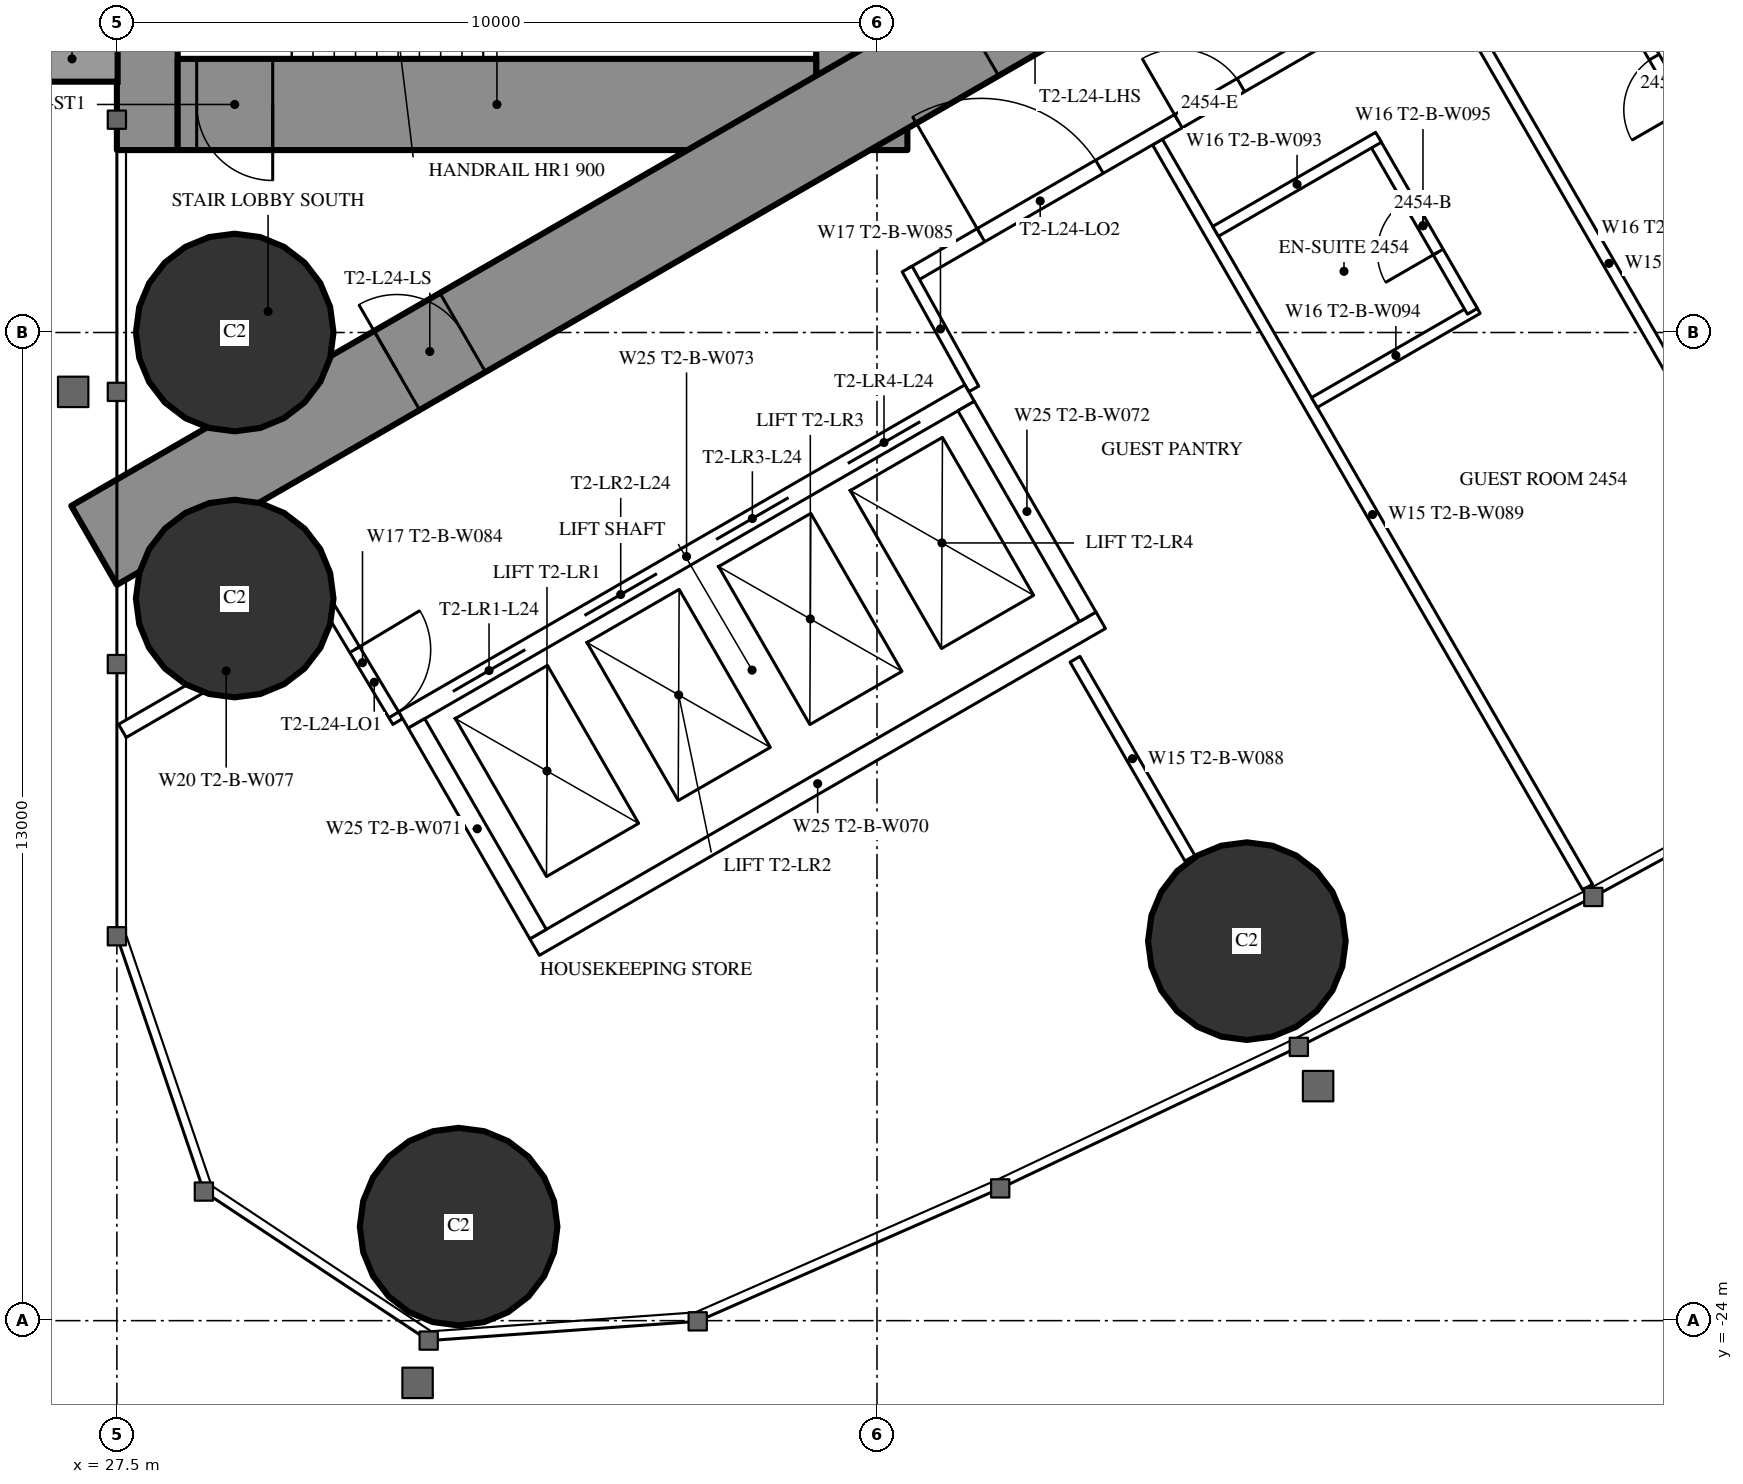
"""IFC4 building model, lengths in metres.
Left out: names, types, materials, properties, quantities, classifications, styles, units other than length and angle.
Written with IfcOpenShell. Run it as: python <this file> out.ifc"""

import sys

from ifc_helpers import new_model, si_unit, direction, frame, frame_2d, origin, origin_2d, place, context, subcontext, project, spatial, rectangle, hollow_circle, extrude, element, fill, save


model = new_model("IFC4")
c1 = context("Model", 3, precision=1e-05, world=origin(), true_north=direction((0.0, 1.0)))
c2 = subcontext(c1, "Body", "Model", "MODEL_VIEW")
j1 = project(units=[si_unit("LENGTHUNIT", "METRE"), si_unit("PLANEANGLEUNIT", "RADIAN")], contexts=[c1])
p1 = place(None, origin())
s1 = spatial("IfcSite", under=j1, at=p1, CompositionType="ELEMENT")
p2 = place(p1, origin())
s2 = spatial("IfcBuilding", under=s1, at=p2, CompositionType="ELEMENT")
p3 = place(p2, frame((0.0, 0.0, 94.1)))
s3 = spatial("IfcBuildingStorey", under=s2, at=p3, CompositionType="ELEMENT", Elevation=94.1)
for number, where, z_axis, x_axis in (
    (1, (31.996, -22.763, 0.0), (0.0, 0.0, 1.0), (1.0, 0.0, 0.0)),
    (2, (29.05, -11.0, 0.0), (0.0, 0.0, 1.0), (1.0, 0.0, 0.0)),
    (3, (29.05, -14.5, 0.0), (0.0, 0.0, 1.0), (1.0, 0.0, 0.0)),
    (4, (42.366, -19.007, 0.0), (0.0, 0.0, 1.0), (1.0, 0.0, 0.0)),
):
    element("IfcColumn", number, at=place(p3, frame(where, z_axis=z_axis, x_axis=x_axis)), inside=s3, PredefinedType="COLUMN", context=c2, shape_type="SweptSolid", body=[
        extrude(hollow_circle(Radius=1.3, WallThickness=0.1, at=origin_2d()), origin(), (0.0, 0.0, 1.0), 3.5),
    ])
p4 = place(p3, frame((27.9, -8.6, 0.0), z_axis=(0.0, 0.0, 1.0), x_axis=(0.0, 1.0, 0.0)))
e5 = element("IfcWall", 5, at=p4, inside=s3, PredefinedType="SHEAR", context=c2, shape_type="SweptSolid", body=[
    extrude(rectangle(XDim=17.2, YDim=0.8, at=frame_2d((8.6, 0.0))), origin(), (0.0, 0.0, 1.0), 3.5),
])
p5 = place(p4, frame((2.45, 0.0, 0.6)))
e6 = element("IfcOpeningElement", 6, at=p5, cuts=e5, PredefinedType="OPENING", context=c2, shape_type="SweptSolid", body=[
    extrude(rectangle(XDim=0.6, YDim=2.1, at=frame_2d((0.3, 1.05))), frame((0.0, 0.41, 0.0), z_axis=(0.0, -1.0, 0.0), x_axis=(1.0, 0.0, 0.0)), (0.0, 0.0, 1.0), 0.82),
])
p6 = place(p4, frame((14.15, 0.0, 0.6)))
e7 = element("IfcOpeningElement", 7, at=p6, cuts=e5, PredefinedType="OPENING", context=c2, shape_type="SweptSolid", body=[
    extrude(rectangle(XDim=0.6, YDim=2.1, at=frame_2d((0.3, 1.05))), frame((0.0, 0.41, 0.0), z_axis=(0.0, -1.0, 0.0), x_axis=(1.0, 0.0, 0.0)), (0.0, 0.0, 1.0), 0.82),
])
p7 = place(p3, frame((37.3, -8.6, 0.0), z_axis=(0.0, 0.0, 1.0), x_axis=(0.0, 1.0, 0.0)))
e8 = element("IfcWall", 8, at=p7, inside=s3, PredefinedType="SHEAR", context=c2, shape_type="SweptSolid", body=[
    extrude(rectangle(XDim=17.2, YDim=1.2, at=frame_2d((8.6, 0.0))), origin(), (0.0, 0.0, 1.0), 3.5),
])
p8 = place(p7, frame((7.7, 0.0, 0.0)))
e9 = element("IfcOpeningElement", 9, at=p8, cuts=e8, PredefinedType="OPENING", context=c2, shape_type="SweptSolid", body=[
    extrude(rectangle(XDim=1.8, YDim=2.2, at=frame_2d((0.9, 1.1))), frame((0.0, 0.61, 0.0), z_axis=(0.0, -1.0, 0.0), x_axis=(1.0, 0.0, 0.0)), (0.0, 0.0, 1.0), 1.22),
])
p9 = place(p3, frame((28.3, -8.0, 0.0), z_axis=(0.0, 0.0, 1.0), x_axis=(1.0, 0.0, 0.0)))
e10 = element("IfcWall", 10, at=p9, inside=s3, PredefinedType="SHEAR", context=c2, shape_type="SweptSolid", body=[
    extrude(rectangle(XDim=8.4, YDim=1.2, at=frame_2d((4.2, 0.0))), origin(), (0.0, 0.0, 1.0), 3.5),
])
p10 = place(p9, frame((0.25, 0.0, 0.0)))
e11 = element("IfcOpeningElement", 11, at=p10, cuts=e10, PredefinedType="OPENING", context=c2, shape_type="SweptSolid", body=[
    extrude(rectangle(XDim=1.0, YDim=2.2, at=frame_2d((0.5, 1.1))), frame((0.0, 0.61, 0.0), z_axis=(0.0, -1.0, 0.0), x_axis=(1.0, 0.0, 0.0)), (0.0, 0.0, 1.0), 1.22),
])
p11 = place(p3, frame((27.2, -13.8, 0.0), z_axis=(0.0, 0.0, 1.0), x_axis=(0.866027159892, 0.499996958321, 0.0)))
e12 = element("IfcWall", 12, at=p11, inside=s3, PredefinedType="SHEAR", context=c2, shape_type="SweptSolid", body=[
    extrude(rectangle(XDim=27.947, YDim=1.2, at=frame_2d((13.973, 0.0))), origin(), (0.0, 0.0, 1.0), 3.5),
])
p12 = place(p11, frame((4.6, 0.0, 0.0)))
e13 = element("IfcOpeningElement", 13, at=p12, cuts=e12, PredefinedType="OPENING", context=c2, shape_type="SweptSolid", body=[
    extrude(rectangle(XDim=1.0, YDim=2.2, at=frame_2d((0.5, 1.1))), frame((0.0, 0.61, 0.0), z_axis=(0.0, -1.0, 0.0), x_axis=(1.0, 0.0, 0.0)), (0.0, 0.0, 1.0), 1.22),
])
p13 = place(p11, frame((13.395, 0.0, 0.0)))
e14 = element("IfcOpeningElement", 14, at=p13, cuts=e12, PredefinedType="OPENING", context=c2, shape_type="SweptSolid", body=[
    extrude(rectangle(XDim=1.8, YDim=2.2, at=frame_2d((0.9, 1.1))), frame((0.0, 0.61, 0.0), z_axis=(0.0, -1.0, 0.0), x_axis=(1.0, 0.0, 0.0)), (0.0, 0.0, 1.0), 1.22),
])
p14 = place(p3, frame((41.19, -8.494, 0.0), z_axis=(0.0, 0.0, 1.0), x_axis=(0.49999258054, -0.866029687369, 0.0)))
e15 = element("IfcWall", 15, at=p14, inside=s3, PredefinedType="PARTITIONING", context=c2, shape_type="SweptSolid", body=[
    extrude(rectangle(XDim=11.318, YDim=0.15, at=frame_2d((5.659, 0.0))), origin(), (0.0, 0.0, 1.0), 3.25),
])
p15 = place(p3, frame((44.954, -6.321, 0.0), z_axis=(0.0, 0.0, 1.0), x_axis=(0.500018676722, -0.866014620505, 0.0)))
e16 = element("IfcWall", 16, at=p15, inside=s3, PredefinedType="PARTITIONING", context=c2, shape_type="SweptSolid", body=[
    extrude(rectangle(XDim=8.704, YDim=0.15, at=frame_2d((4.352, 0.0))), origin(), (0.0, 0.0, 1.0), 2.2),
])
p16 = place(p3, frame((40.105, -15.299, 0.0), z_axis=(0.0, 0.0, 1.0), x_axis=(0.499978822259, -0.866037630414, 0.0)))
e17 = element("IfcWall", 17, at=p16, inside=s3, PredefinedType="PARTITIONING", context=c2, shape_type="SweptSolid", body=[
    extrude(rectangle(XDim=3.023, YDim=0.15, at=frame_2d((1.511, 0.0))), origin(), (0.0, 0.0, 1.0), 3.25),
])
p17 = place(p3, frame((27.572, -16.241, 0.0), z_axis=(0.0, 0.0, 1.0), x_axis=(0.866029654818, 0.499992636921, 0.0)))
e18 = element("IfcWall", 18, at=p17, inside=s3, PredefinedType="PARTITIONING", context=c2, shape_type="SweptSolid", body=[
    extrude(rectangle(XDim=3.155, YDim=0.2, at=frame_2d((1.577, 0.0))), origin(), (0.0, 0.0, 1.0), 3.25),
])
p18 = place(p3, frame((37.96, -10.243, 0.0), z_axis=(0.0, 0.0, 1.0), x_axis=(0.866026429433, 0.499998223521, 0.0)))
e19 = element("IfcWall", 19, at=p18, inside=s3, PredefinedType="PARTITIONING", context=c2, shape_type="SweptSolid", body=[
    extrude(rectangle(XDim=20.487, YDim=0.2, at=frame_2d((10.243, 0.0))), origin(), (0.0, 0.0, 1.0), 3.25),
])
p19 = place(p18, frame((4.047, 0.0, 0.0)))
e20 = element("IfcOpeningElement", 20, at=p19, cuts=e19, PredefinedType="OPENING", context=c2, shape_type="SweptSolid", body=[
    extrude(rectangle(XDim=0.95, YDim=2.2, at=frame_2d((0.475, 1.1))), frame((0.0, 0.11, 0.0), z_axis=(0.0, -1.0, 0.0), x_axis=(1.0, 0.0, 0.0)), (0.0, 0.0, 1.0), 0.22),
])
p20 = place(p18, frame((11.04, 0.0, 0.0)))
e21 = element("IfcOpeningElement", 21, at=p20, cuts=e19, PredefinedType="OPENING", context=c2, shape_type="SweptSolid", body=[
    extrude(rectangle(XDim=0.95, YDim=2.2, at=frame_2d((0.475, 1.1))), frame((0.0, 0.11, 0.0), z_axis=(0.0, -1.0, 0.0), x_axis=(1.0, 0.0, 0.0)), (0.0, 0.0, 1.0), 0.22),
])
p21 = place(p18, frame((13.035, 0.0, 0.0)))
e22 = element("IfcOpeningElement", 22, at=p21, cuts=e19, PredefinedType="OPENING", context=c2, shape_type="SweptSolid", body=[
    extrude(rectangle(XDim=0.95, YDim=2.2, at=frame_2d((0.475, 1.1))), frame((0.0, 0.11, 0.0), z_axis=(0.0, -1.0, 0.0), x_axis=(1.0, 0.0, 0.0)), (0.0, 0.0, 1.0), 0.22),
])
p22 = place(p18, frame((17.085, 0.0, 0.0)))
e23 = element("IfcOpeningElement", 23, at=p22, cuts=e19, PredefinedType="OPENING", context=c2, shape_type="SweptSolid", body=[
    extrude(rectangle(XDim=0.95, YDim=2.2, at=frame_2d((0.475, 1.1))), frame((0.0, 0.11, 0.0), z_axis=(0.0, -1.0, 0.0), x_axis=(1.0, 0.0, 0.0)), (0.0, 0.0, 1.0), 0.22),
])
p23 = place(p18, frame((1.048, 0.0, 0.0)))
e24 = element("IfcOpeningElement", 24, at=p23, cuts=e19, PredefinedType="OPENING", context=c2, shape_type="SweptSolid", body=[
    extrude(rectangle(XDim=1.8, YDim=2.2, at=frame_2d((0.9, 1.1))), frame((0.0, 0.11, 0.0), z_axis=(0.0, -1.0, 0.0), x_axis=(1.0, 0.0, 0.0)), (0.0, 0.0, 1.0), 0.22),
])
p24 = place(p3, frame((30.267, -14.569, 0.0), z_axis=(0.0, 0.0, 1.0), x_axis=(0.514336634837, -0.857588377991, 0.0)))
e25 = element("IfcWall", 25, at=p24, inside=s3, PredefinedType="PARTITIONING", context=c2, shape_type="SweptSolid", body=[
    extrude(rectangle(XDim=1.805, YDim=0.15, at=frame_2d((0.903, 0.0))), origin(), (0.0, 0.0, 1.0), 3.25),
])
p25 = place(p24, frame((0.703, 0.0, 0.0)))
e26 = element("IfcOpeningElement", 26, at=p25, cuts=e25, PredefinedType="OPENING", context=c2, shape_type="SweptSolid", body=[
    extrude(rectangle(XDim=1.0, YDim=2.2, at=frame_2d((0.5, 1.1))), frame((0.0, 0.085, 0.0), z_axis=(0.0, -1.0, 0.0), x_axis=(1.0, 0.0, 0.0)), (0.0, 0.0, 1.0), 0.17),
])
p26 = place(p3, frame((38.773, -11.742, 0.0), z_axis=(0.0, 0.0, 1.0), x_axis=(-0.485528096672, 0.8742210632, 0.0)))
e27 = element("IfcWall", 27, at=p26, inside=s3, PredefinedType="PARTITIONING", context=c2, shape_type="SweptSolid", body=[
    extrude(rectangle(XDim=1.805, YDim=0.15, at=frame_2d((0.903, 0.0))), origin(), (0.0, 0.0, 1.0), 3.25),
])
p27 = place(p3, frame((43.255, -11.921, 0.0), z_axis=(0.0, 0.0, 1.0), x_axis=(0.866006523861, 0.500032699561, 0.0)))
e28 = element("IfcWall", 28, at=p27, inside=s3, PredefinedType="PARTITIONING", context=c2, shape_type="SweptSolid", body=[
    extrude(rectangle(XDim=2.475, YDim=0.15, at=frame_2d((1.237, 0.0))), origin(), (0.0, 0.0, 1.0), 3.25),
])
p28 = place(p3, frame((44.033, -8.469, 0.0), z_axis=(0.0, 0.0, 1.0), x_axis=(0.500047596559, -0.865997922154, 0.0)))
e29 = element("IfcWall", 29, at=p28, inside=s3, PredefinedType="PARTITIONING", context=c2, shape_type="SweptSolid", body=[
    extrude(rectangle(XDim=2.6, YDim=0.15, at=frame_2d((1.3, 0.0))), origin(), (0.0, 0.0, 1.0), 3.25),
])
p29 = place(p28, frame((0.9, 0.0, 0.0)))
e30 = element("IfcOpeningElement", 30, at=p29, cuts=e29, PredefinedType="OPENING", context=c2, shape_type="SweptSolid", body=[
    extrude(rectangle(XDim=0.8, YDim=2.2, at=frame_2d((0.4, 1.1))), frame((0.0, 0.085, 0.0), z_axis=(0.0, -1.0, 0.0), x_axis=(1.0, 0.0, 0.0)), (0.0, 0.0, 1.0), 0.17),
])
p30 = place(p3, frame((41.955, -9.669, 0.0), z_axis=(0.0, 0.0, 1.0), x_axis=(0.866006523861, 0.500032699561, 0.0)))
e31 = element("IfcWall", 31, at=p30, inside=s3, PredefinedType="PARTITIONING", context=c2, shape_type="SweptSolid", body=[
    extrude(rectangle(XDim=2.475, YDim=0.15, at=frame_2d((1.237, 0.0))), origin(), (0.0, 0.0, 1.0), 3.25),
])
p31 = place(p3, frame((47.275, -6.597, 0.0), z_axis=(0.0, 0.0, 1.0), x_axis=(0.499936506574, -0.866062058628, 0.0)))
e32 = element("IfcWall", 32, at=p31, inside=s3, PredefinedType="PARTITIONING", context=c2, shape_type="SweptSolid", body=[
    extrude(rectangle(XDim=2.6, YDim=0.15, at=frame_2d((1.3, 0.0))), origin(), (0.0, 0.0, 1.0), 3.25),
])
p32 = place(p31, frame((0.9, 0.0, 0.0)))
e33 = element("IfcOpeningElement", 33, at=p32, cuts=e32, PredefinedType="OPENING", context=c2, shape_type="SweptSolid", body=[
    extrude(rectangle(XDim=0.8, YDim=2.2, at=frame_2d((0.4, 1.1))), frame((0.0, 0.085, 0.0), z_axis=(0.0, -1.0, 0.0), x_axis=(1.0, 0.0, 0.0)), (0.0, 0.0, 1.0), 0.17),
])
p33 = place(p3, frame((31.271, -16.097, 0.0), z_axis=(0.0, 0.0, 1.0), x_axis=(0.86604045752, 0.499973925258, 0.0)))
e34 = element("IfcWall", 34, at=p33, inside=s3, PredefinedType="PARTITIONING", context=c2, shape_type="SweptSolid", body=[
    extrude(rectangle(XDim=8.6, YDim=0.25, at=frame_2d((4.3, 0.0))), origin(), (0.0, 0.0, 1.0), 3.25),
])
p34 = place(p33, frame((0.75, 0.0, 0.0)))
e35 = element("IfcOpeningElement", 35, at=p34, cuts=e34, PredefinedType="OPENING", context=c2, shape_type="SweptSolid", body=[
    extrude(rectangle(XDim=1.1, YDim=2.2, at=frame_2d((0.55, 1.1))), frame((0.0, 0.135, 0.0), z_axis=(0.0, -1.0, 0.0), x_axis=(1.0, 0.0, 0.0)), (0.0, 0.0, 1.0), 0.27),
])
p35 = place(p33, frame((2.75, 0.0, 0.0)))
e36 = element("IfcOpeningElement", 36, at=p35, cuts=e34, PredefinedType="OPENING", context=c2, shape_type="SweptSolid", body=[
    extrude(rectangle(XDim=1.1, YDim=2.2, at=frame_2d((0.55, 1.1))), frame((0.0, 0.135, 0.0), z_axis=(0.0, -1.0, 0.0), x_axis=(1.0, 0.0, 0.0)), (0.0, 0.0, 1.0), 0.27),
])
p36 = place(p33, frame((4.75, 0.0, 0.0)))
e37 = element("IfcOpeningElement", 37, at=p36, cuts=e34, PredefinedType="OPENING", context=c2, shape_type="SweptSolid", body=[
    extrude(rectangle(XDim=1.1, YDim=2.2, at=frame_2d((0.55, 1.1))), frame((0.0, 0.135, 0.0), z_axis=(0.0, -1.0, 0.0), x_axis=(1.0, 0.0, 0.0)), (0.0, 0.0, 1.0), 0.27),
])
p37 = place(p33, frame((6.75, 0.0, 0.0)))
e38 = element("IfcOpeningElement", 38, at=p37, cuts=e34, PredefinedType="OPENING", context=c2, shape_type="SweptSolid", body=[
    extrude(rectangle(XDim=1.1, YDim=2.2, at=frame_2d((0.55, 1.1))), frame((0.0, 0.135, 0.0), z_axis=(0.0, -1.0, 0.0), x_axis=(1.0, 0.0, 0.0)), (0.0, 0.0, 1.0), 0.27),
])
p38 = place(p3, frame((32.996, -19.086, 0.0), z_axis=(0.0, 0.0, 1.0), x_axis=(0.866028165386, 0.499995216735, 0.0)))
e39 = element("IfcWall", 39, at=p38, inside=s3, PredefinedType="PARTITIONING", context=c2, shape_type="SweptSolid", body=[
    extrude(rectangle(XDim=8.6, YDim=0.25, at=frame_2d((4.3, 0.0))), origin(), (0.0, 0.0, 1.0), 3.25),
])
for number, where, z_axis, x_axis in (
    (40, (31.441, -16.143, 0.0), (0.0, 0.0, 1.0), (0.5, -0.866, 0.0)),
    (41, (38.673, -11.968, 0.0), (0.0, 0.0, 1.0), (0.5, -0.866, 0.0)),
):
    element("IfcWall", number, at=place(p3, frame(where, z_axis=z_axis, x_axis=x_axis)), inside=s3, PredefinedType="PARTITIONING", context=c2, shape_type="SweptSolid", body=[
        extrude(rectangle(XDim=3.201, YDim=0.25, at=frame_2d((1.6, 0.0))), origin(), (0.0, 0.0, 1.0), 3.25),
    ])
p39 = place(p29, origin())
e42 = element("IfcDoor", 42, at=p39, inside=s3, OperationType="SINGLE_SWING_RIGHT", PredefinedType="DOOR", context=c2, shape_type="SweptSolid", body=[
    extrude(rectangle(XDim=0.8, YDim=2.2, at=frame_2d((0.4, 1.1))), frame((0.0, 0.025, 0.0), z_axis=(0.0, -1.0, 0.0), x_axis=(1.0, 0.0, 0.0)), (0.0, 0.0, 1.0), 0.05),
])
fill(e30, e42)
p40 = place(p19, origin())
e43 = element("IfcDoor", 43, at=p40, inside=s3, OperationType="SINGLE_SWING_LEFT", PredefinedType="DOOR", context=c2, shape_type="SweptSolid", body=[
    extrude(rectangle(XDim=0.95, YDim=2.2, at=frame_2d((0.475, 1.1))), frame((0.0, 0.025, 0.0), z_axis=(0.0, -1.0, 0.0), x_axis=(1.0, 0.0, 0.0)), (0.0, 0.0, 1.0), 0.05),
])
fill(e20, e43)
p41 = place(p32, origin())
e44 = element("IfcDoor", 44, at=p41, inside=s3, OperationType="SINGLE_SWING_RIGHT", PredefinedType="DOOR", context=c2, shape_type="SweptSolid", body=[
    extrude(rectangle(XDim=0.8, YDim=2.2, at=frame_2d((0.4, 1.1))), frame((0.0, 0.025, 0.0), z_axis=(0.0, -1.0, 0.0), x_axis=(1.0, 0.0, 0.0)), (0.0, 0.0, 1.0), 0.05),
])
fill(e33, e44)
p42 = place(p25, origin())
e45 = element("IfcDoor", 45, at=p42, inside=s3, OperationType="SINGLE_SWING_LEFT", PredefinedType="DOOR", context=c2, shape_type="SweptSolid", body=[
    extrude(rectangle(XDim=1.0, YDim=2.2, at=frame_2d((0.5, 1.1))), frame((0.0, 0.025, 0.0), z_axis=(0.0, -1.0, 0.0), x_axis=(1.0, 0.0, 0.0)), (0.0, 0.0, 1.0), 0.05),
])
fill(e26, e45)
p43 = place(p23, origin())
e46 = element("IfcDoor", 46, at=p43, inside=s3, OperationType="DOUBLE_DOOR_SINGLE_SWING", PredefinedType="DOOR", context=c2, shape_type="SweptSolid", body=[
    extrude(rectangle(XDim=1.8, YDim=2.2, at=frame_2d((0.9, 1.1))), frame((0.0, 0.025, 0.0), z_axis=(0.0, -1.0, 0.0), x_axis=(1.0, 0.0, 0.0)), (0.0, 0.0, 1.0), 0.05),
])
fill(e24, e46)
p44 = place(p12, origin())
e47 = element("IfcDoor", 47, at=p44, inside=s3, OperationType="SINGLE_SWING_LEFT", PredefinedType="DOOR", context=c2, shape_type="SweptSolid", body=[
    extrude(rectangle(XDim=1.0, YDim=2.2, at=frame_2d((0.5, 1.1))), frame((0.0, 0.025, 0.0), z_axis=(0.0, -1.0, 0.0), x_axis=(1.0, 0.0, 0.0)), (0.0, 0.0, 1.0), 0.05),
])
fill(e13, e47)
p45 = place(p10, origin())
e48 = element("IfcDoor", 48, at=p45, inside=s3, OperationType="SINGLE_SWING_RIGHT", PredefinedType="DOOR", context=c2, shape_type="SweptSolid", body=[
    extrude(rectangle(XDim=1.0, YDim=2.2, at=frame_2d((0.5, 1.1))), frame((0.0, 0.025, 0.0), z_axis=(0.0, -1.0, 0.0), x_axis=(1.0, 0.0, 0.0)), (0.0, 0.0, 1.0), 0.05),
])
fill(e11, e48)
p46 = place(p34, origin())
e49 = element("IfcDoor", 49, at=p46, inside=s3, OperationType="DOUBLE_DOOR_SLIDING", PredefinedType="USERDEFINED", context=c2, shape_type="SweptSolid", body=[
    extrude(rectangle(XDim=1.1, YDim=2.2, at=frame_2d((0.55, 1.1))), frame((0.0, 0.025, 0.0), z_axis=(0.0, -1.0, 0.0), x_axis=(1.0, 0.0, 0.0)), (0.0, 0.0, 1.0), 0.05),
])
fill(e35, e49)
p47 = place(p35, origin())
e50 = element("IfcDoor", 50, at=p47, inside=s3, OperationType="DOUBLE_DOOR_SLIDING", PredefinedType="USERDEFINED", context=c2, shape_type="SweptSolid", body=[
    extrude(rectangle(XDim=1.1, YDim=2.2, at=frame_2d((0.55, 1.1))), frame((0.0, 0.025, 0.0), z_axis=(0.0, -1.0, 0.0), x_axis=(1.0, 0.0, 0.0)), (0.0, 0.0, 1.0), 0.05),
])
fill(e36, e50)
p48 = place(p36, origin())
e51 = element("IfcDoor", 51, at=p48, inside=s3, OperationType="DOUBLE_DOOR_SLIDING", PredefinedType="USERDEFINED", context=c2, shape_type="SweptSolid", body=[
    extrude(rectangle(XDim=1.1, YDim=2.2, at=frame_2d((0.55, 1.1))), frame((0.0, 0.025, 0.0), z_axis=(0.0, -1.0, 0.0), x_axis=(1.0, 0.0, 0.0)), (0.0, 0.0, 1.0), 0.05),
])
fill(e37, e51)
p49 = place(p37, origin())
e52 = element("IfcDoor", 52, at=p49, inside=s3, OperationType="DOUBLE_DOOR_SLIDING", PredefinedType="USERDEFINED", context=c2, shape_type="SweptSolid", body=[
    extrude(rectangle(XDim=1.1, YDim=2.2, at=frame_2d((0.55, 1.1))), frame((0.0, 0.025, 0.0), z_axis=(0.0, -1.0, 0.0), x_axis=(1.0, 0.0, 0.0)), (0.0, 0.0, 1.0), 0.05),
])
fill(e38, e52)
save(model, sys.argv[1])
